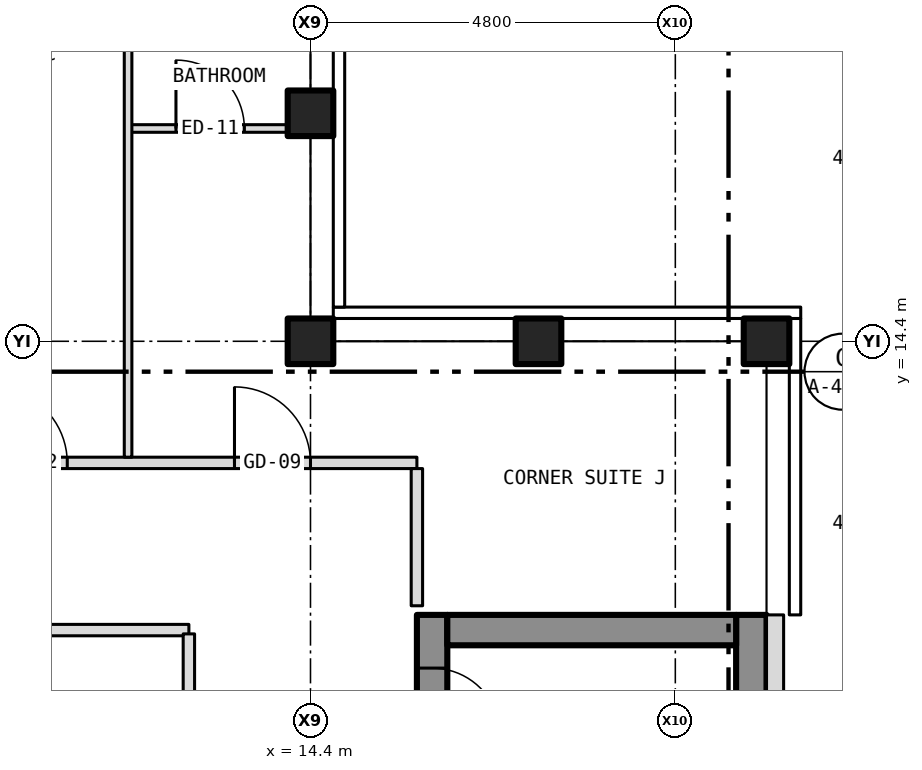
"""IFC4 building model, lengths in metres.
Left out: names, types, materials, properties, quantities, classifications, styles, units other than length and angle.
Written with IfcOpenShell. Run it as: python <this file> out.ifc"""

import sys

from ifc_helpers import new_model, si_unit, direction, frame, frame_2d, origin, origin_2d, place, context, subcontext, project, spatial, rectangle, hollow_rectangle, extrude, element, fill, save


model = new_model("IFC4")
c1 = context("Model", 3, precision=1e-05, world=origin(), true_north=direction((0.0, 1.0)))
c2 = subcontext(c1, "Body", "Model", "MODEL_VIEW")
j1 = project(units=[si_unit("LENGTHUNIT", "METRE"), si_unit("PLANEANGLEUNIT", "RADIAN")], contexts=[c1])
p1 = place(None, origin())
s1 = spatial("IfcSite", under=j1, at=p1, CompositionType="ELEMENT")
p2 = place(p1, origin())
s2 = spatial("IfcBuilding", under=s1, at=p2, CompositionType="ELEMENT")
p3 = place(p2, frame((0.0, 0.0, 244.5)))
s3 = spatial("IfcBuildingStorey", under=s2, at=p3, CompositionType="ELEMENT", Elevation=244.5)
for number, where, z_axis, x_axis in (
    (1, (20.4, 14.4, -0.15), (0.0, 0.0, 1.0), (1.0, 0.0, 0.0)),
    (2, (14.4, 14.4, -0.15), (0.0, 0.0, 1.0), (1.0, 0.0, 0.0)),
    (3, (14.4, 17.4, -0.15), (0.0, 0.0, 1.0), (1.0, 0.0, 0.0)),
    (4, (17.4, 14.4, -0.15), (0.0, 0.0, 1.0), (1.0, 0.0, 0.0)),
):
    element("IfcColumn", number, at=place(p3, frame(where, z_axis=z_axis, x_axis=x_axis)), inside=s3, PredefinedType="COLUMN", context=c2, shape_type="SweptSolid", body=[
        extrude(hollow_rectangle(XDim=0.6, YDim=0.6, WallThickness=0.03, at=origin_2d()), origin(), (0.0, 0.0, 1.0), 3.5),
    ])
p4 = place(p3, frame((16.0, -10.8, 0.0), z_axis=(0.0, 0.0, 1.0), x_axis=(0.0, 1.0, 0.0)))
e5 = element("IfcWall", 5, at=p4, inside=s3, PredefinedType="SHEAR", context=c2, shape_type="SweptSolid", body=[
    extrude(rectangle(XDim=21.6, YDim=0.4, at=frame_2d((10.8, 0.0))), origin(), (0.0, 0.0, 1.0), 3.25),
])
p5 = place(p4, frame((9.4, 0.0, 0.0)))
e6 = element("IfcOpeningElement", 6, at=p5, cuts=e5, PredefinedType="OPENING", context=c2, shape_type="SweptSolid", body=[
    extrude(rectangle(XDim=1.1, YDim=2.1, at=frame_2d((0.55, 1.05))), frame((0.0, 0.212, 0.0), z_axis=(0.0, -1.0, 0.0), x_axis=(1.0, 0.0, 0.0)), (0.0, 0.0, 1.0), 0.424),
])
p6 = place(p4, frame((11.5, 0.0, 0.0)))
e7 = element("IfcOpeningElement", 7, at=p6, cuts=e5, PredefinedType="OPENING", context=c2, shape_type="SweptSolid", body=[
    extrude(rectangle(XDim=1.1, YDim=2.1, at=frame_2d((0.55, 1.05))), frame((0.0, 0.212, 0.0), z_axis=(0.0, -1.0, 0.0), x_axis=(1.0, 0.0, 0.0)), (0.0, 0.0, 1.0), 0.424),
])
p7 = place(p4, frame((13.6, 0.0, 0.0)))
e8 = element("IfcOpeningElement", 8, at=p7, cuts=e5, PredefinedType="OPENING", context=c2, shape_type="SweptSolid", body=[
    extrude(rectangle(XDim=1.1, YDim=2.1, at=frame_2d((0.55, 1.05))), frame((0.0, 0.212, 0.0), z_axis=(0.0, -1.0, 0.0), x_axis=(1.0, 0.0, 0.0)), (0.0, 0.0, 1.0), 0.424),
])
p8 = place(p4, frame((15.7, 0.0, 0.0)))
e9 = element("IfcOpeningElement", 9, at=p8, cuts=e5, PredefinedType="OPENING", context=c2, shape_type="SweptSolid", body=[
    extrude(rectangle(XDim=1.1, YDim=2.1, at=frame_2d((0.55, 1.05))), frame((0.0, 0.212, 0.0), z_axis=(0.0, -1.0, 0.0), x_axis=(1.0, 0.0, 0.0)), (0.0, 0.0, 1.0), 0.424),
])
p9 = place(p4, frame((17.8, 0.0, 0.0)))
e10 = element("IfcOpeningElement", 10, at=p9, cuts=e5, PredefinedType="OPENING", context=c2, shape_type="SweptSolid", body=[
    extrude(rectangle(XDim=1.1, YDim=2.1, at=frame_2d((0.55, 1.05))), frame((0.0, 0.212, 0.0), z_axis=(0.0, -1.0, 0.0), x_axis=(1.0, 0.0, 0.0)), (0.0, 0.0, 1.0), 0.424),
])
p10 = place(p4, frame((5.642, 0.0, 0.0)))
e11 = element("IfcOpeningElement", 11, at=p10, cuts=e5, PredefinedType="OPENING", context=c2, shape_type="SweptSolid", body=[
    extrude(rectangle(XDim=1.1, YDim=2.1, at=frame_2d((0.55, 1.05))), frame((0.0, 0.212, 0.0), z_axis=(0.0, -1.0, 0.0), x_axis=(1.0, 0.0, 0.0)), (0.0, 0.0, 1.0), 0.424),
])
p11 = place(p4, frame((7.5, 0.0, 0.0)))
e12 = element("IfcOpeningElement", 12, at=p11, cuts=e5, PredefinedType="OPENING", context=c2, shape_type="SweptSolid", body=[
    extrude(rectangle(XDim=1.1, YDim=2.1, at=frame_2d((0.55, 1.05))), frame((0.0, 0.212, 0.0), z_axis=(0.0, -1.0, 0.0), x_axis=(1.0, 0.0, 0.0)), (0.0, 0.0, 1.0), 0.424),
])
p12 = place(p4, frame((20.0, 0.0, 0.0)))
e13 = element("IfcOpeningElement", 13, at=p12, cuts=e5, PredefinedType="OPENING", context=c2, shape_type="SweptSolid", body=[
    extrude(rectangle(XDim=0.9, YDim=2.1, at=frame_2d((0.45, 1.05))), frame((0.0, 0.212, 0.0), z_axis=(0.0, -1.0, 0.0), x_axis=(1.0, 0.0, 0.0)), (0.0, 0.0, 1.0), 0.424),
])
p13 = place(p3, frame((20.2, -10.8, 0.0), z_axis=(0.0, 0.0, 1.0), x_axis=(0.0, 1.0, 0.0)))
e14 = element("IfcWall", 14, at=p13, inside=s3, PredefinedType="SHEAR", context=c2, shape_type="SweptSolid", body=[
    extrude(rectangle(XDim=21.6, YDim=0.4, at=frame_2d((10.8, 0.0))), origin(), (0.0, 0.0, 1.0), 3.25),
])
p14 = place(p3, frame((16.2, 10.6, 0.0), z_axis=(0.0, 0.0, 1.0), x_axis=(1.0, 0.0, 0.0)))
e15 = element("IfcWall", 15, at=p14, inside=s3, PredefinedType="SHEAR", context=c2, shape_type="SweptSolid", body=[
    extrude(rectangle(XDim=3.8, YDim=0.4, at=frame_2d((1.9, 0.0))), origin(), (0.0, 0.0, 1.0), 3.25),
])
p15 = place(p3, frame((20.512, -10.8, 0.0), z_axis=(0.0, 0.0, 1.0), x_axis=(0.0, 1.0, 0.0)))
e16 = element("IfcWall", 16, at=p15, inside=s3, PredefinedType="SOLIDWALL", context=c2, shape_type="SweptSolid", body=[
    extrude(rectangle(XDim=21.6, YDim=0.225, at=frame_2d((10.8, 0.0))), origin(), (0.0, 0.0, 1.0), 3.5),
])
p16 = place(p15, frame((2.95, 0.0, 1.0)))
e17 = element("IfcOpeningElement", 17, at=p16, cuts=e16, PredefinedType="OPENING", context=c2, shape_type="SweptSolid", body=[
    extrude(rectangle(XDim=0.6, YDim=1.5, at=frame_2d((0.3, 0.75))), frame((0.0, 0.125, 0.0), z_axis=(0.0, -1.0, 0.0), x_axis=(1.0, 0.0, 0.0)), (0.0, 0.0, 1.0), 0.249),
])
p17 = place(p3, frame((9.7, 10.6, 0.0), z_axis=(0.0, 0.0, 1.0), x_axis=(1.0, 0.0, 0.0)))
e18 = element("IfcWall", 18, at=p17, inside=s3, PredefinedType="PARTITIONING", context=c2, shape_type="SweptSolid", body=[
    extrude(rectangle(XDim=3.1, YDim=0.15, at=frame_2d((1.55, 0.0))), origin(), (0.0, 0.0, 1.0), 3.35),
])
p18 = place(p3, frame((-15.8, 12.8, 0.0), z_axis=(0.0, 0.0, 1.0), x_axis=(1.0, 0.0, 0.0)))
e19 = element("IfcWall", 19, at=p18, inside=s3, PredefinedType="PARTITIONING", context=c2, shape_type="SweptSolid", body=[
    extrude(rectangle(XDim=31.6, YDim=0.15, at=frame_2d((15.8, 0.0))), origin(), (0.0, 0.0, 1.0), 3.35),
])
p19 = place(p18, frame((6.8, 0.0, 0.0)))
e20 = element("IfcOpeningElement", 20, at=p19, cuts=e19, PredefinedType="OPENING", context=c2, shape_type="SweptSolid", body=[
    extrude(rectangle(XDim=1.0, YDim=2.1, at=frame_2d((0.5, 1.05))), frame((0.0, 0.087, 0.0), z_axis=(0.0, -1.0, 0.0), x_axis=(1.0, 0.0, 0.0)), (0.0, 0.0, 1.0), 0.174),
])
p20 = place(p18, frame((15.35, 0.0, 0.0)))
e21 = element("IfcOpeningElement", 21, at=p20, cuts=e19, PredefinedType="OPENING", context=c2, shape_type="SweptSolid", body=[
    extrude(rectangle(XDim=0.9, YDim=2.1, at=frame_2d((0.45, 1.05))), frame((0.0, 0.087, 0.0), z_axis=(0.0, -1.0, 0.0), x_axis=(1.0, 0.0, 0.0)), (0.0, 0.0, 1.0), 0.174),
])
p21 = place(p18, frame((26.0, 0.0, 0.0)))
e22 = element("IfcOpeningElement", 22, at=p21, cuts=e19, PredefinedType="OPENING", context=c2, shape_type="SweptSolid", body=[
    extrude(rectangle(XDim=1.0, YDim=2.1, at=frame_2d((0.5, 1.05))), frame((0.0, 0.087, 0.0), z_axis=(0.0, -1.0, 0.0), x_axis=(1.0, 0.0, 0.0)), (0.0, 0.0, 1.0), 0.174),
])
p22 = place(p18, frame((1.4, 0.0, 0.0)))
e23 = element("IfcOpeningElement", 23, at=p22, cuts=e19, PredefinedType="OPENING", context=c2, shape_type="SweptSolid", body=[
    extrude(rectangle(XDim=1.0, YDim=2.1, at=frame_2d((0.5, 1.05))), frame((0.0, 0.087, 0.0), z_axis=(0.0, -1.0, 0.0), x_axis=(1.0, 0.0, 0.0)), (0.0, 0.0, 1.0), 0.174),
])
p23 = place(p18, frame((29.2, 0.0, 0.0)))
e24 = element("IfcOpeningElement", 24, at=p23, cuts=e19, PredefinedType="OPENING", context=c2, shape_type="SweptSolid", body=[
    extrude(rectangle(XDim=1.0, YDim=2.1, at=frame_2d((0.5, 1.05))), frame((0.0, 0.087, 0.0), z_axis=(0.0, -1.0, 0.0), x_axis=(1.0, 0.0, 0.0)), (0.0, 0.0, 1.0), 0.174),
])
p24 = place(p3, frame((12.0, 17.2, 0.0), z_axis=(0.0, 0.0, 1.0), x_axis=(1.0, 0.0, 0.0)))
e25 = element("IfcWall", 25, at=p24, inside=s3, PredefinedType="PARTITIONING", context=c2, shape_type="SweptSolid", body=[
    extrude(rectangle(XDim=2.28, YDim=0.1, at=frame_2d((1.14, 0.0))), origin(), (0.0, 0.0, 1.0), 3.35),
])
p25 = place(p24, frame((0.63, 0.0, 0.0)))
e26 = element("IfcOpeningElement", 26, at=p25, cuts=e25, PredefinedType="OPENING", context=c2, shape_type="SweptSolid", body=[
    extrude(rectangle(XDim=0.9, YDim=2.1, at=frame_2d((0.45, 1.05))), frame((0.0, 0.062, 0.0), z_axis=(0.0, -1.0, 0.0), x_axis=(1.0, 0.0, 0.0)), (0.0, 0.0, 1.0), 0.124),
])
p26 = place(p3, frame((12.0, 12.875, 0.0), z_axis=(0.0, 0.0, 1.0), x_axis=(0.0, 1.0, 0.0)))
e27 = element("IfcWall", 27, at=p26, inside=s3, PredefinedType="PARTITIONING", context=c2, shape_type="SweptSolid", body=[
    extrude(rectangle(XDim=7.855, YDim=0.1, at=frame_2d((3.927, 0.0))), origin(), (0.0, 0.0, 1.0), 3.35),
])
p27 = place(p3, frame((12.8, 3.375, 0.0), z_axis=(0.0, 0.0, 1.0), x_axis=(0.0, 1.0, 0.0)))
e28 = element("IfcWall", 28, at=p27, inside=s3, PredefinedType="PARTITIONING", context=c2, shape_type="SweptSolid", body=[
    extrude(rectangle(XDim=7.175, YDim=0.15, at=frame_2d((3.587, 0.0))), origin(), (0.0, 0.0, 1.0), 3.35),
])
p28 = place(p3, frame((15.8, 10.92, 0.0), z_axis=(0.0, 0.0, 1.0), x_axis=(0.0, 1.0, 0.0)))
e29 = element("IfcWall", 29, at=p28, inside=s3, PredefinedType="PARTITIONING", context=c2, shape_type="SweptSolid", body=[
    extrude(rectangle(XDim=1.805, YDim=0.15, at=frame_2d((0.903, 0.0))), origin(), (0.0, 0.0, 1.0), 3.35),
])
p29 = place(p12, origin())
e30 = element("IfcDoor", 30, at=p29, inside=s3, OperationType="SINGLE_SWING_LEFT", PredefinedType="DOOR", context=c2, shape_type="SweptSolid", body=[
    extrude(rectangle(XDim=0.9, YDim=2.1, at=frame_2d((0.45, 1.05))), frame((0.0, 0.025, 0.0), z_axis=(0.0, -1.0, 0.0), x_axis=(1.0, 0.0, 0.0)), (0.0, 0.0, 1.0), 0.05),
])
fill(e13, e30)
p30 = place(p21, origin())
e31 = element("IfcDoor", 31, at=p30, inside=s3, OperationType="SINGLE_SWING_LEFT", PredefinedType="DOOR", context=c2, shape_type="SweptSolid", body=[
    extrude(rectangle(XDim=1.0, YDim=2.1, at=frame_2d((0.5, 1.05))), frame((0.0, 0.025, 0.0), z_axis=(0.0, -1.0, 0.0), x_axis=(1.0, 0.0, 0.0)), (0.0, 0.0, 1.0), 0.05),
])
fill(e22, e31)
p31 = place(p25, origin())
e32 = element("IfcDoor", 32, at=p31, inside=s3, OperationType="SINGLE_SWING_LEFT", PredefinedType="DOOR", context=c2, shape_type="SweptSolid", body=[
    extrude(rectangle(XDim=0.9, YDim=2.1, at=frame_2d((0.45, 1.05))), frame((0.0, 0.025, 0.0), z_axis=(0.0, -1.0, 0.0), x_axis=(1.0, 0.0, 0.0)), (0.0, 0.0, 1.0), 0.05),
])
fill(e26, e32)
p32 = place(p23, origin())
e33 = element("IfcDoor", 33, at=p32, inside=s3, OperationType="SINGLE_SWING_LEFT", PredefinedType="DOOR", context=c2, shape_type="SweptSolid", body=[
    extrude(rectangle(XDim=1.0, YDim=2.1, at=frame_2d((0.5, 1.05))), frame((0.0, 0.025, 0.0), z_axis=(0.0, -1.0, 0.0), x_axis=(1.0, 0.0, 0.0)), (0.0, 0.0, 1.0), 0.05),
])
fill(e24, e33)
save(model, sys.argv[1])
